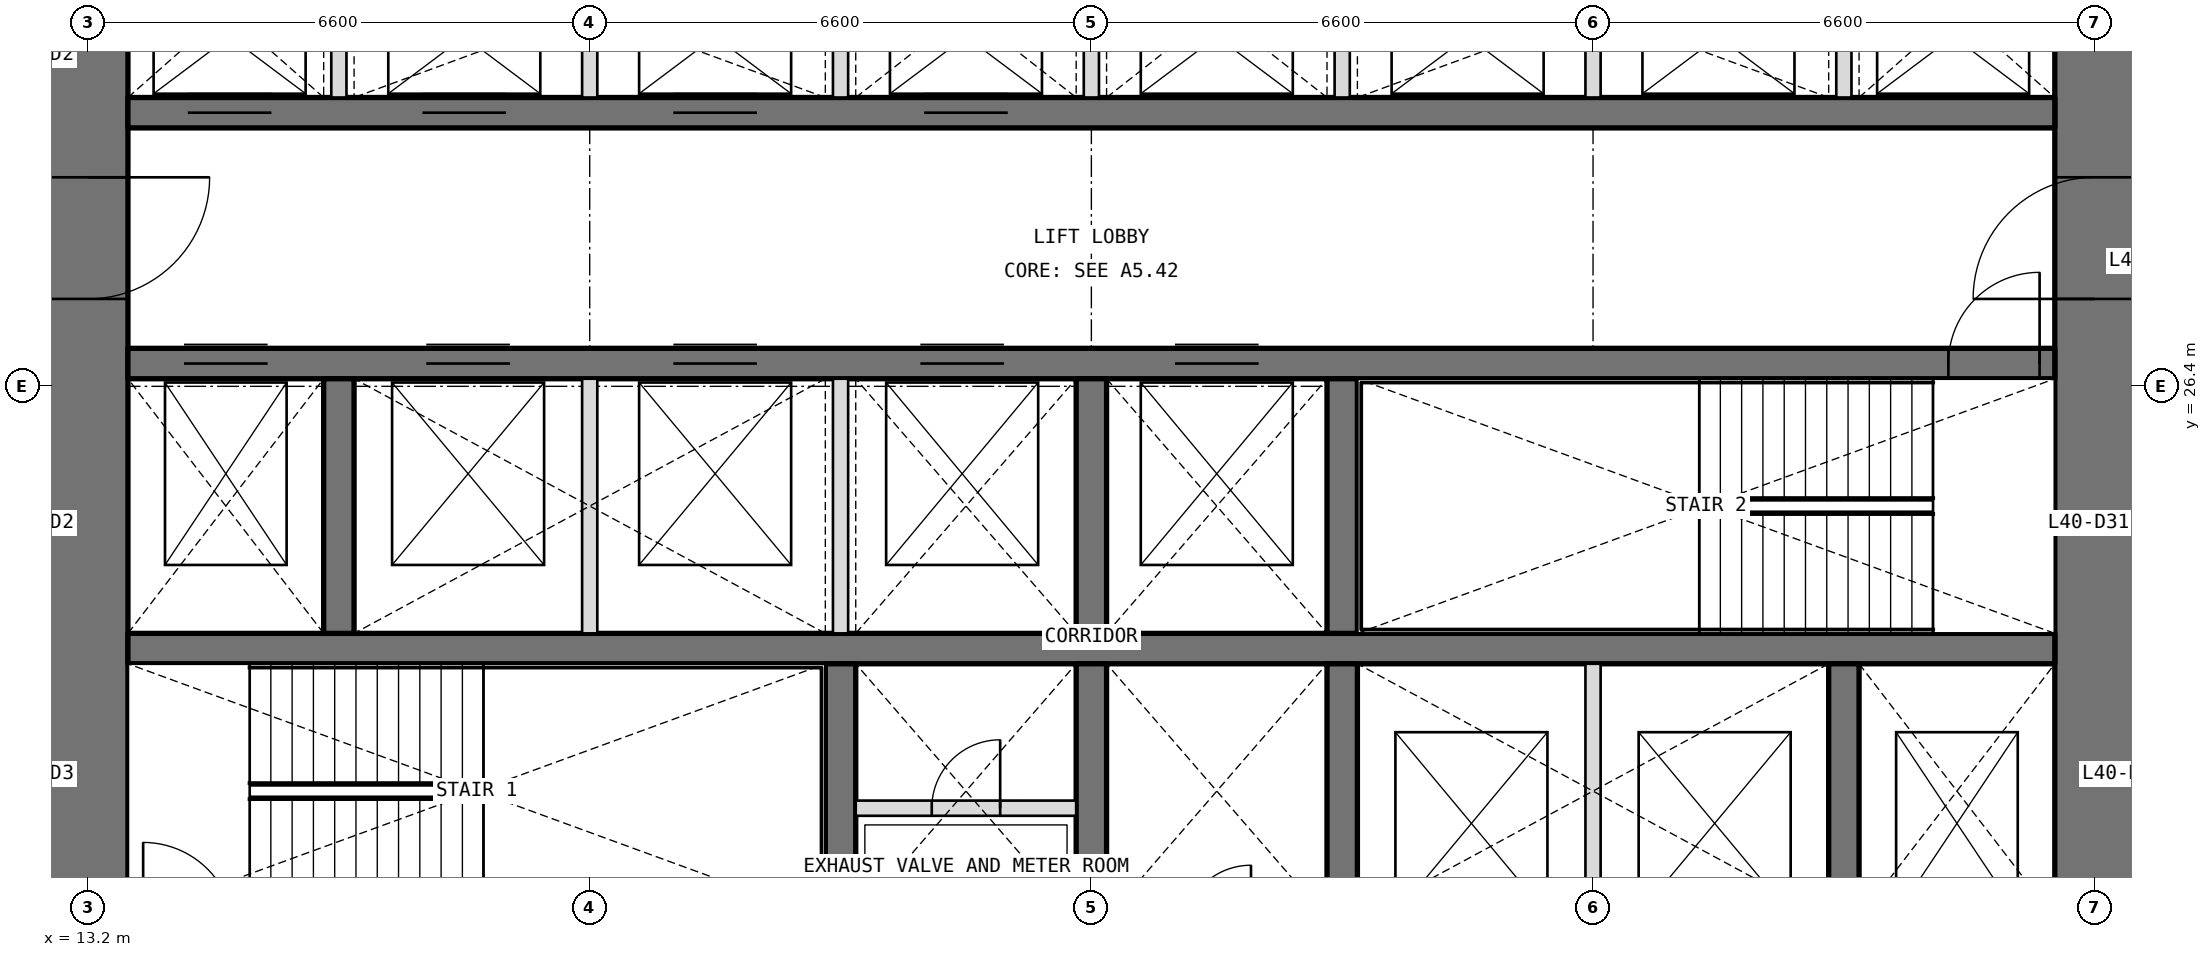
"""IFC4 building model, lengths in metres.
Left out: names, types, materials, properties, quantities, classifications, styles, units other than length and angle.
Written with IfcOpenShell. Run it as: python <this file> out.ifc"""

import sys

from ifc_helpers import new_model, si_unit, direction, frame, frame_2d, origin, place, context, subcontext, project, spatial, rectangle, extrude, element, fill, save


model = new_model("IFC4")
c1 = context("Model", 3, precision=1e-05, world=origin(), true_north=direction((0.0, 1.0)))
c2 = subcontext(c1, "Body", "Model", "MODEL_VIEW")
j1 = project(units=[si_unit("LENGTHUNIT", "METRE"), si_unit("PLANEANGLEUNIT", "RADIAN")], contexts=[c1])
p1 = place(None, origin())
s1 = spatial("IfcSite", under=j1, at=p1, CompositionType="ELEMENT")
p2 = place(p1, origin())
s2 = spatial("IfcBuilding", under=s1, at=p2, CompositionType="ELEMENT")
p3 = place(p2, frame((0.0, 0.0, 176.7)))
s3 = spatial("IfcBuildingStorey", under=s2, at=p3, CompositionType="ELEMENT", Elevation=176.7)
p4 = place(p3, frame((39.6, 13.725, 0.0), z_axis=(0.0, 0.0, 1.0), x_axis=(0.0, 1.0, 0.0)))
e1 = element("IfcWall", 1, at=p4, inside=s3, PredefinedType="SHEAR", context=c2, shape_type="SweptSolid", body=[
    extrude(rectangle(XDim=18.75, YDim=1.05, at=frame_2d((9.375, 0.0))), origin(), (0.0, 0.0, 1.0), 4.2),
])
p5 = place(p4, frame((3.025, 0.0, 0.0)))
e2 = element("IfcOpeningElement", 2, at=p5, cuts=e1, PredefinedType="OPENING", context=c2, shape_type="SweptSolid", body=[
    extrude(rectangle(XDim=1.6, YDim=2.1, at=frame_2d((0.8, 1.05))), frame((0.0, 0.535, 0.0), z_axis=(0.0, -1.0, 0.0), x_axis=(1.0, 0.0, 0.0)), (0.0, 0.0, 1.0), 1.07),
])
p6 = place(p4, frame((13.825, 0.0, 0.0)))
e3 = element("IfcOpeningElement", 3, at=p6, cuts=e1, PredefinedType="OPENING", context=c2, shape_type="SweptSolid", body=[
    extrude(rectangle(XDim=1.6, YDim=2.1, at=frame_2d((0.8, 1.05))), frame((0.0, 0.535, 0.0), z_axis=(0.0, -1.0, 0.0), x_axis=(1.0, 0.0, 0.0)), (0.0, 0.0, 1.0), 1.07),
])
p7 = place(p3, frame((13.2, 32.475, 0.0), z_axis=(0.0, 0.0, 1.0), x_axis=(0.0, -1.0, 0.0)))
e4 = element("IfcWall", 4, at=p7, inside=s3, PredefinedType="SHEAR", context=c2, shape_type="SweptSolid", body=[
    extrude(rectangle(XDim=18.75, YDim=1.05, at=frame_2d((9.375, 0.0))), origin(), (0.0, 0.0, 1.0), 4.2),
])
p8 = place(p7, frame((14.125, 0.0, 0.0)))
e5 = element("IfcOpeningElement", 5, at=p8, cuts=e4, PredefinedType="OPENING", context=c2, shape_type="SweptSolid", body=[
    extrude(rectangle(XDim=1.6, YDim=2.1, at=frame_2d((0.8, 1.05))), frame((0.0, 0.535, 0.0), z_axis=(0.0, -1.0, 0.0), x_axis=(1.0, 0.0, 0.0)), (0.0, 0.0, 1.0), 1.07),
])
p9 = place(p7, frame((3.325, 0.0, 0.0)))
e6 = element("IfcOpeningElement", 6, at=p9, cuts=e4, PredefinedType="OPENING", context=c2, shape_type="SweptSolid", body=[
    extrude(rectangle(XDim=1.6, YDim=2.1, at=frame_2d((0.8, 1.05))), frame((0.0, 0.535, 0.0), z_axis=(0.0, -1.0, 0.0), x_axis=(1.0, 0.0, 0.0)), (0.0, 0.0, 1.0), 1.07),
])
p10 = place(p3, frame((13.725, 22.95, 0.0), z_axis=(0.0, 0.0, 1.0), x_axis=(1.0, 0.0, 0.0)))
e7 = element("IfcWall", 7, at=p10, inside=s3, PredefinedType="SHEAR", context=c2, shape_type="SweptSolid", body=[
    extrude(rectangle(XDim=25.35, YDim=0.4, at=frame_2d((12.675, 0.0))), origin(), (0.0, 0.0, 1.0), 4.2),
])
p11 = place(p3, frame((13.725, 26.7, 0.0), z_axis=(0.0, 0.0, 1.0), x_axis=(1.0, 0.0, 0.0)))
e8 = element("IfcWall", 8, at=p11, inside=s3, PredefinedType="SHEAR", context=c2, shape_type="SweptSolid", body=[
    extrude(rectangle(XDim=25.35, YDim=0.4, at=frame_2d((12.675, 0.0))), origin(), (0.0, 0.0, 1.0), 4.2),
])
p12 = place(p11, frame((23.95, 0.0, 0.0)))
e9 = element("IfcOpeningElement", 9, at=p12, cuts=e8, PredefinedType="OPENING", context=c2, shape_type="SweptSolid", body=[
    extrude(rectangle(XDim=1.2, YDim=2.1, at=frame_2d((0.6, 1.05))), frame((0.0, 0.21, 0.0), z_axis=(0.0, -1.0, 0.0), x_axis=(1.0, 0.0, 0.0)), (0.0, 0.0, 1.0), 0.42),
])
p13 = place(p11, frame((0.738, 0.0, 0.0)))
e10 = element("IfcOpeningElement", 10, at=p13, cuts=e8, PredefinedType="OPENING", context=c2, shape_type="SweptSolid", body=[
    extrude(rectangle(XDim=1.1, YDim=2.1, at=frame_2d((0.55, 1.05))), frame((0.0, 0.21, 0.0), z_axis=(0.0, -1.0, 0.0), x_axis=(1.0, 0.0, 0.0)), (0.0, 0.0, 1.0), 0.42),
])
p14 = place(p11, frame((3.925, 0.0, 0.0)))
e11 = element("IfcOpeningElement", 11, at=p14, cuts=e8, PredefinedType="OPENING", context=c2, shape_type="SweptSolid", body=[
    extrude(rectangle(XDim=1.1, YDim=2.1, at=frame_2d((0.55, 1.05))), frame((0.0, 0.21, 0.0), z_axis=(0.0, -1.0, 0.0), x_axis=(1.0, 0.0, 0.0)), (0.0, 0.0, 1.0), 0.42),
])
p15 = place(p11, frame((7.175, 0.0, 0.0)))
e12 = element("IfcOpeningElement", 12, at=p15, cuts=e8, PredefinedType="OPENING", context=c2, shape_type="SweptSolid", body=[
    extrude(rectangle(XDim=1.1, YDim=2.1, at=frame_2d((0.55, 1.05))), frame((0.0, 0.21, 0.0), z_axis=(0.0, -1.0, 0.0), x_axis=(1.0, 0.0, 0.0)), (0.0, 0.0, 1.0), 0.42),
])
p16 = place(p11, frame((10.425, 0.0, 0.0)))
e13 = element("IfcOpeningElement", 13, at=p16, cuts=e8, PredefinedType="OPENING", context=c2, shape_type="SweptSolid", body=[
    extrude(rectangle(XDim=1.1, YDim=2.1, at=frame_2d((0.55, 1.05))), frame((0.0, 0.21, 0.0), z_axis=(0.0, -1.0, 0.0), x_axis=(1.0, 0.0, 0.0)), (0.0, 0.0, 1.0), 0.42),
])
p17 = place(p11, frame((13.775, 0.0, 0.0)))
e14 = element("IfcOpeningElement", 14, at=p17, cuts=e8, PredefinedType="OPENING", context=c2, shape_type="SweptSolid", body=[
    extrude(rectangle(XDim=1.1, YDim=2.1, at=frame_2d((0.55, 1.05))), frame((0.0, 0.21, 0.0), z_axis=(0.0, -1.0, 0.0), x_axis=(1.0, 0.0, 0.0)), (0.0, 0.0, 1.0), 0.42),
])
p18 = place(p3, frame((13.725, 30.0, 0.0), z_axis=(0.0, 0.0, 1.0), x_axis=(1.0, 0.0, 0.0)))
e15 = element("IfcWall", 15, at=p18, inside=s3, PredefinedType="SHEAR", context=c2, shape_type="SweptSolid", body=[
    extrude(rectangle(XDim=25.35, YDim=0.4, at=frame_2d((12.675, 0.0))), origin(), (0.0, 0.0, 1.0), 4.2),
])
p19 = place(p18, frame((0.788, 0.0, 0.0)))
e16 = element("IfcOpeningElement", 16, at=p19, cuts=e15, PredefinedType="OPENING", context=c2, shape_type="SweptSolid", body=[
    extrude(rectangle(XDim=1.1, YDim=2.1, at=frame_2d((0.55, 1.05))), frame((0.0, 0.21, 0.0), z_axis=(0.0, -1.0, 0.0), x_axis=(1.0, 0.0, 0.0)), (0.0, 0.0, 1.0), 0.42),
])
p20 = place(p18, frame((3.875, 0.0, 0.0)))
e17 = element("IfcOpeningElement", 17, at=p20, cuts=e15, PredefinedType="OPENING", context=c2, shape_type="SweptSolid", body=[
    extrude(rectangle(XDim=1.1, YDim=2.1, at=frame_2d((0.55, 1.05))), frame((0.0, 0.21, 0.0), z_axis=(0.0, -1.0, 0.0), x_axis=(1.0, 0.0, 0.0)), (0.0, 0.0, 1.0), 0.42),
])
p21 = place(p18, frame((7.175, 0.0, 0.0)))
e18 = element("IfcOpeningElement", 18, at=p21, cuts=e15, PredefinedType="OPENING", context=c2, shape_type="SweptSolid", body=[
    extrude(rectangle(XDim=1.1, YDim=2.1, at=frame_2d((0.55, 1.05))), frame((0.0, 0.21, 0.0), z_axis=(0.0, -1.0, 0.0), x_axis=(1.0, 0.0, 0.0)), (0.0, 0.0, 1.0), 0.42),
])
p22 = place(p18, frame((10.475, 0.0, 0.0)))
e19 = element("IfcOpeningElement", 19, at=p22, cuts=e15, PredefinedType="OPENING", context=c2, shape_type="SweptSolid", body=[
    extrude(rectangle(XDim=1.1, YDim=2.1, at=frame_2d((0.55, 1.05))), frame((0.0, 0.21, 0.0), z_axis=(0.0, -1.0, 0.0), x_axis=(1.0, 0.0, 0.0)), (0.0, 0.0, 1.0), 0.42),
])
for number, where, z_axis, x_axis in (
    (20, (23.1, 19.4, 0.0), (0.0, 0.0, 1.0), (0.0, 1.0, 0.0)),
    (21, (26.4, 19.4, 0.0), (0.0, 0.0, 1.0), (0.0, 1.0, 0.0)),
    (22, (29.7, 19.4, 0.0), (0.0, 0.0, 1.0), (0.0, 1.0, 0.0)),
    (23, (36.3, 19.4, 0.0), (0.0, 0.0, 1.0), (0.0, 1.0, 0.0)),
    (24, (16.5, 23.15, 0.0), (0.0, 0.0, 1.0), (0.0, 1.0, 0.0)),
    (25, (26.4, 23.15, 0.0), (0.0, 0.0, 1.0), (0.0, 1.0, 0.0)),
    (26, (29.7, 23.15, 0.0), (0.0, 0.0, 1.0), (0.0, 1.0, 0.0)),
):
    element("IfcWall", number, at=place(p3, frame(where, z_axis=z_axis, x_axis=x_axis)), inside=s3, PredefinedType="SHEAR", context=c2, shape_type="SweptSolid", body=[
        extrude(rectangle(XDim=3.35, YDim=0.4, at=frame_2d((1.675, 0.0))), origin(), (0.0, 0.0, 1.0), 4.2),
    ])
for number, where, z_axis, x_axis in (
    (27, (16.5, 30.2, 0.0), (0.0, 0.0, 1.0), (0.0, 1.0, 0.0)),
    (28, (19.8, 30.2, 0.0), (0.0, 0.0, 1.0), (0.0, 1.0, 0.0)),
    (29, (23.1, 30.2, 0.0), (0.0, 0.0, 1.0), (0.0, 1.0, 0.0)),
    (30, (26.4, 30.2, 0.0), (0.0, 0.0, 1.0), (0.0, 1.0, 0.0)),
    (31, (29.7, 30.2, 0.0), (0.0, 0.0, 1.0), (0.0, 1.0, 0.0)),
    (32, (33.0, 30.2, 0.0), (0.0, 0.0, 1.0), (0.0, 1.0, 0.0)),
    (33, (36.3, 30.2, 0.0), (0.0, 0.0, 1.0), (0.0, 1.0, 0.0)),
):
    element("IfcWall", number, at=place(p3, frame(where, z_axis=z_axis, x_axis=x_axis)), inside=s3, PredefinedType="PARTITIONING", context=c2, shape_type="SweptSolid", body=[
        extrude(rectangle(XDim=2.275, YDim=0.2, at=frame_2d((1.138, 0.0))), origin(), (0.0, 0.0, 1.0), 4.2),
    ])
for number, where, z_axis, x_axis in (
    (34, (33.0, 19.4, 0.0), (0.0, 0.0, 1.0), (0.0, 1.0, 0.0)),
    (35, (19.8, 23.15, 0.0), (0.0, 0.0, 1.0), (0.0, 1.0, 0.0)),
    (36, (23.1, 23.15, 0.0), (0.0, 0.0, 1.0), (0.0, 1.0, 0.0)),
):
    element("IfcWall", number, at=place(p3, frame(where, z_axis=z_axis, x_axis=x_axis)), inside=s3, PredefinedType="PARTITIONING", context=c2, shape_type="SweptSolid", body=[
        extrude(rectangle(XDim=3.35, YDim=0.2, at=frame_2d((1.675, 0.0))), origin(), (0.0, 0.0, 1.0), 4.2),
    ])
p23 = place(p3, frame((23.3, 20.85, 0.0), z_axis=(0.0, 0.0, 1.0), x_axis=(1.0, 0.0, 0.0)))
e37 = element("IfcWall", 37, at=p23, inside=s3, PredefinedType="PARTITIONING", context=c2, shape_type="SweptSolid", body=[
    extrude(rectangle(XDim=2.9, YDim=0.2, at=frame_2d((1.45, 0.0))), origin(), (0.0, 0.0, 1.0), 3.9),
])
p24 = place(p23, frame((1.0, 0.0, 0.0)))
e38 = element("IfcOpeningElement", 38, at=p24, cuts=e37, PredefinedType="OPENING", context=c2, shape_type="SweptSolid", body=[
    extrude(rectangle(XDim=0.9, YDim=2.1, at=frame_2d((0.45, 1.05))), frame((0.0, 0.11, 0.0), z_axis=(0.0, -1.0, 0.0), x_axis=(1.0, 0.0, 0.0)), (0.0, 0.0, 1.0), 0.22),
])
p25 = place(p24, origin())
e39 = element("IfcDoor", 39, at=p25, inside=s3, OperationType="SINGLE_SWING_RIGHT", PredefinedType="DOOR", context=c2, shape_type="SweptSolid", body=[
    extrude(rectangle(XDim=0.9, YDim=2.1, at=frame_2d((0.45, 1.05))), frame((0.0, 0.025, 0.0), z_axis=(0.0, -1.0, 0.0), x_axis=(1.0, 0.0, 0.0)), (0.0, 0.0, 1.0), 0.05),
])
fill(e38, e39)
p26 = place(p12, origin())
e40 = element("IfcDoor", 40, at=p26, inside=s3, OperationType="SINGLE_SWING_RIGHT", PredefinedType="DOOR", context=c2, shape_type="SweptSolid", body=[
    extrude(rectangle(XDim=1.2, YDim=2.1, at=frame_2d((0.6, 1.05))), frame((0.0, 0.025, 0.0), z_axis=(0.0, -1.0, 0.0), x_axis=(1.0, 0.0, 0.0)), (0.0, 0.0, 1.0), 0.05),
])
fill(e9, e40)
p27 = place(p9, origin())
e41 = element("IfcDoor", 41, at=p27, inside=s3, OperationType="DOUBLE_DOOR_DOUBLE_SWING", PredefinedType="DOOR", context=c2, shape_type="SweptSolid", body=[
    extrude(rectangle(XDim=1.6, YDim=2.1, at=frame_2d((0.8, 1.05))), frame((0.0, 0.025, 0.0), z_axis=(0.0, -1.0, 0.0), x_axis=(1.0, 0.0, 0.0)), (0.0, 0.0, 1.0), 0.05),
])
fill(e6, e41)
p28 = place(p6, origin())
e42 = element("IfcDoor", 42, at=p28, inside=s3, OperationType="DOUBLE_DOOR_DOUBLE_SWING", PredefinedType="DOOR", context=c2, shape_type="SweptSolid", body=[
    extrude(rectangle(XDim=1.6, YDim=2.1, at=frame_2d((0.8, 1.05))), frame((0.0, 0.025, 0.0), z_axis=(0.0, -1.0, 0.0), x_axis=(1.0, 0.0, 0.0)), (0.0, 0.0, 1.0), 0.05),
])
fill(e3, e42)
p29 = place(p19, origin())
e43 = element("IfcDoor", 43, at=p29, inside=s3, OperationType="DOUBLE_DOOR_SLIDING", PredefinedType="DOOR", context=c2, shape_type="SweptSolid", body=[
    extrude(rectangle(XDim=1.1, YDim=2.1, at=frame_2d((0.55, 1.05))), frame((0.0, 0.025, 0.0), z_axis=(0.0, -1.0, 0.0), x_axis=(1.0, 0.0, 0.0)), (0.0, 0.0, 1.0), 0.05),
])
fill(e16, e43)
p30 = place(p20, origin())
e44 = element("IfcDoor", 44, at=p30, inside=s3, OperationType="DOUBLE_DOOR_SLIDING", PredefinedType="DOOR", context=c2, shape_type="SweptSolid", body=[
    extrude(rectangle(XDim=1.1, YDim=2.1, at=frame_2d((0.55, 1.05))), frame((0.0, 0.025, 0.0), z_axis=(0.0, -1.0, 0.0), x_axis=(1.0, 0.0, 0.0)), (0.0, 0.0, 1.0), 0.05),
])
fill(e17, e44)
p31 = place(p21, origin())
e45 = element("IfcDoor", 45, at=p31, inside=s3, OperationType="DOUBLE_DOOR_SLIDING", PredefinedType="DOOR", context=c2, shape_type="SweptSolid", body=[
    extrude(rectangle(XDim=1.1, YDim=2.1, at=frame_2d((0.55, 1.05))), frame((0.0, 0.025, 0.0), z_axis=(0.0, -1.0, 0.0), x_axis=(1.0, 0.0, 0.0)), (0.0, 0.0, 1.0), 0.05),
])
fill(e18, e45)
p32 = place(p22, origin())
e46 = element("IfcDoor", 46, at=p32, inside=s3, OperationType="DOUBLE_DOOR_SLIDING", PredefinedType="DOOR", context=c2, shape_type="SweptSolid", body=[
    extrude(rectangle(XDim=1.1, YDim=2.1, at=frame_2d((0.55, 1.05))), frame((0.0, 0.025, 0.0), z_axis=(0.0, -1.0, 0.0), x_axis=(1.0, 0.0, 0.0)), (0.0, 0.0, 1.0), 0.05),
])
fill(e19, e46)
p33 = place(p13, origin())
e47 = element("IfcDoor", 47, at=p33, inside=s3, OperationType="DOUBLE_DOOR_SLIDING", PredefinedType="DOOR", context=c2, shape_type="SweptSolid", body=[
    extrude(rectangle(XDim=1.1, YDim=2.1, at=frame_2d((0.55, 1.05))), frame((0.0, 0.025, 0.0), z_axis=(0.0, -1.0, 0.0), x_axis=(1.0, 0.0, 0.0)), (0.0, 0.0, 1.0), 0.05),
])
fill(e10, e47)
p34 = place(p14, origin())
e48 = element("IfcDoor", 48, at=p34, inside=s3, OperationType="DOUBLE_DOOR_SLIDING", PredefinedType="DOOR", context=c2, shape_type="SweptSolid", body=[
    extrude(rectangle(XDim=1.1, YDim=2.1, at=frame_2d((0.55, 1.05))), frame((0.0, 0.025, 0.0), z_axis=(0.0, -1.0, 0.0), x_axis=(1.0, 0.0, 0.0)), (0.0, 0.0, 1.0), 0.05),
])
fill(e11, e48)
p35 = place(p15, origin())
e49 = element("IfcDoor", 49, at=p35, inside=s3, OperationType="DOUBLE_DOOR_SLIDING", PredefinedType="DOOR", context=c2, shape_type="SweptSolid", body=[
    extrude(rectangle(XDim=1.1, YDim=2.1, at=frame_2d((0.55, 1.05))), frame((0.0, 0.025, 0.0), z_axis=(0.0, -1.0, 0.0), x_axis=(1.0, 0.0, 0.0)), (0.0, 0.0, 1.0), 0.05),
])
fill(e12, e49)
p36 = place(p16, origin())
e50 = element("IfcDoor", 50, at=p36, inside=s3, OperationType="DOUBLE_DOOR_SLIDING", PredefinedType="DOOR", context=c2, shape_type="SweptSolid", body=[
    extrude(rectangle(XDim=1.1, YDim=2.1, at=frame_2d((0.55, 1.05))), frame((0.0, 0.025, 0.0), z_axis=(0.0, -1.0, 0.0), x_axis=(1.0, 0.0, 0.0)), (0.0, 0.0, 1.0), 0.05),
])
fill(e13, e50)
p37 = place(p17, origin())
e51 = element("IfcDoor", 51, at=p37, inside=s3, OperationType="DOUBLE_DOOR_SLIDING", PredefinedType="DOOR", context=c2, shape_type="SweptSolid", body=[
    extrude(rectangle(XDim=1.1, YDim=2.1, at=frame_2d((0.55, 1.05))), frame((0.0, 0.025, 0.0), z_axis=(0.0, -1.0, 0.0), x_axis=(1.0, 0.0, 0.0)), (0.0, 0.0, 1.0), 0.05),
])
fill(e14, e51)
save(model, sys.argv[1])
